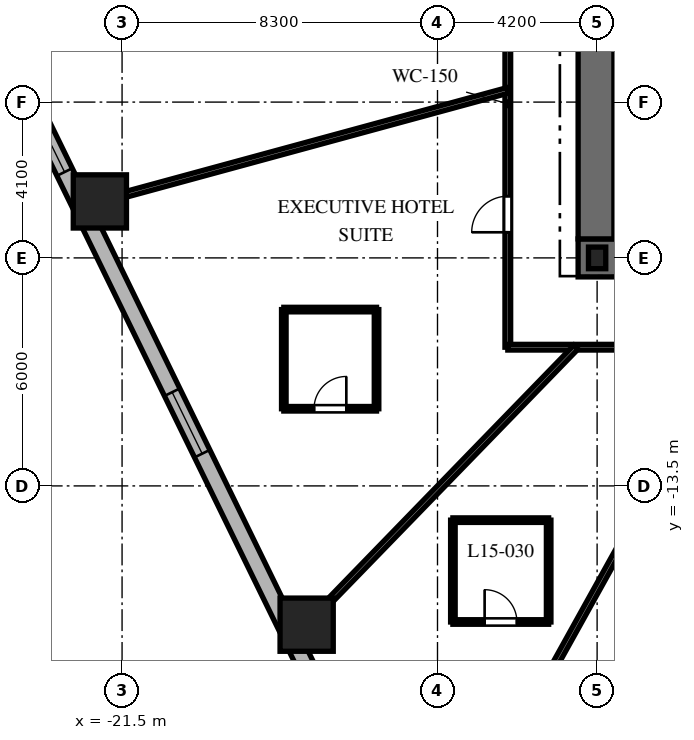
"""IFC4 building model, lengths in metres.
Left out: names, types, materials, properties, quantities, classifications, styles, units other than length and angle.
Written with IfcOpenShell. Run it as: python <this file> out.ifc"""

import sys

from ifc_helpers import new_model, si_unit, direction, frame, frame_2d, origin, origin_2d, place, context, subcontext, project, spatial, rectangle, i_section, extrude, element, fill, save


model = new_model("IFC4")
c1 = context("Model", 3, precision=1e-05, world=origin(), true_north=direction((0.0, 1.0)))
c2 = subcontext(c1, "Body", "Model", "MODEL_VIEW")
j1 = project(units=[si_unit("LENGTHUNIT", "METRE"), si_unit("PLANEANGLEUNIT", "RADIAN")], contexts=[c1])
p1 = place(None, origin())
s1 = spatial("IfcSite", under=j1, at=p1, CompositionType="ELEMENT")
p2 = place(p1, origin())
s2 = spatial("IfcBuilding", under=s1, at=p2, CompositionType="ELEMENT")
p3 = place(p2, frame((0.0, 0.0, 67.5)))
s3 = spatial("IfcBuildingStorey", under=s2, at=p3, CompositionType="ELEMENT", Elevation=67.5)
p4 = place(p3, frame((-9.5, -7.5, 0.0), z_axis=(0.0, 0.0, 1.0), x_axis=(1.0, 0.0, 0.0)))
e1 = element("IfcWall", 1, at=p4, inside=s3, PredefinedType="SHEAR", context=c2, shape_type="SweptSolid", body=[
    extrude(rectangle(XDim=19.0, YDim=1.0, at=frame_2d((9.5, 0.0))), origin(), (0.0, 0.0, 1.0), 3.7),
])
p5 = place(p4, frame((9.55, 0.0, 0.0)))
e2 = element("IfcOpeningElement", 2, at=p5, cuts=e1, PredefinedType="OPENING", context=c2, shape_type="SweptSolid", body=[
    extrude(rectangle(XDim=1.0, YDim=2.15, at=frame_2d((0.5, 1.075))), frame((0.0, 0.51, 0.0), z_axis=(0.0, -1.0, 0.0), x_axis=(1.0, 0.0, 0.0)), (0.0, 0.0, 1.0), 1.02),
])
p6 = place(p3, frame((-9.0, -7.0, 0.0), z_axis=(0.0, 0.0, 1.0), x_axis=(0.0, 1.0, 0.0)))
e3 = element("IfcWall", 3, at=p6, inside=s3, PredefinedType="SHEAR", context=c2, shape_type="SweptSolid", body=[
    extrude(rectangle(XDim=14.0, YDim=1.0, at=frame_2d((7.0, 0.0))), origin(), (0.0, 0.0, 1.0), 3.7),
])
p7 = place(p6, frame((10.125, 0.0, 0.0)))
e4 = element("IfcOpeningElement", 4, at=p7, cuts=e3, PredefinedType="OPENING", context=c2, shape_type="SweptSolid", body=[
    extrude(rectangle(XDim=1.05, YDim=2.15, at=frame_2d((0.525, 1.075))), frame((0.0, 0.51, 0.0), z_axis=(0.0, -1.0, 0.0), x_axis=(1.0, 0.0, 0.0)), (0.0, 0.0, 1.0), 1.02),
])
p8 = place(p3, frame((-8.458, -6.985, 0.0), z_axis=(0.0, 0.0, 1.0), x_axis=(0.0, 1.0, 0.0)))
e5 = element("IfcWall", 5, at=p8, inside=s3, PredefinedType="SHEAR", context=c2, shape_type="SweptSolid", body=[
    extrude(rectangle(XDim=9.143, YDim=0.2, at=frame_2d((4.572, 0.0))), origin(), (0.0, 0.0, 1.0), 3.7),
])
p9 = place(p3, frame((-9.0, -7.5, 0.0), z_axis=(0.0, 0.0, 1.0), x_axis=(1.0, 0.0, 0.0)))
e6 = element("IfcColumn", 6, at=p9, inside=s3, PredefinedType="COLUMN", context=c2, shape_type="SweptSolid", body=[
    extrude(i_section(OverallWidth=0.454, OverallDepth=0.569, WebThickness=0.078, FlangeThickness=0.125, at=origin_2d()), origin(), (0.0, 0.0, 1.0), 3.7),
])
for number, where, z_axis, x_axis in (
    (7, (-22.084, -6.014, 0.0), (0.0, 0.0, 1.0), (1.0, 0.0, 0.0)),
    (8, (-16.643, -17.152, 0.0), (0.0, 0.0, 1.0), (1.0, 0.0, 0.0)),
):
    element("IfcColumn", number, at=place(p3, frame(where, z_axis=z_axis, x_axis=x_axis)), inside=s3, PredefinedType="COLUMN", context=c2, shape_type="SweptSolid", body=[
        extrude(rectangle(XDim=1.4, YDim=1.4, at=origin_2d()), origin(), (0.0, 0.0, 1.0), 3.7),
    ])
p10 = place(p3, frame((-24.336, -2.532, 0.0), z_axis=(0.0, 0.0, 1.0), x_axis=(0.438931326393, -0.898520612291, 0.0)))
e9 = element("IfcWall", 9, at=p10, inside=s3, PredefinedType="SOLIDWALL", context=c2, shape_type="SweptSolid", body=[
    extrude(rectangle(XDim=20.623, YDim=0.45, at=frame_2d((10.312, 0.0))), origin(), (0.0, 0.0, 1.0), 3.4),
])
p11 = place(p10, frame((1.214, 0.0, 0.8)))
e10 = element("IfcOpeningElement", 10, at=p11, cuts=e9, PredefinedType="OPENING", context=c2, shape_type="SweptSolid", body=[
    extrude(rectangle(XDim=1.8, YDim=1.8, at=frame_2d((0.9, 0.9))), frame((0.0, 0.235, 0.0), z_axis=(0.0, -1.0, 0.0), x_axis=(1.0, 0.0, 0.0)), (0.0, 0.0, 1.0), 0.47),
])
p12 = place(p10, frame((9.462, 0.0, 0.8)))
e11 = element("IfcOpeningElement", 11, at=p12, cuts=e9, PredefinedType="OPENING", context=c2, shape_type="SweptSolid", body=[
    extrude(rectangle(XDim=1.8, YDim=1.8, at=frame_2d((0.9, 0.9))), frame((0.0, 0.235, 0.0), z_axis=(0.0, -1.0, 0.0), x_axis=(1.0, 0.0, 0.0)), (0.0, 0.0, 1.0), 0.47),
])
p13 = place(p10, frame((17.66, 0.0, 0.8)))
e12 = element("IfcOpeningElement", 12, at=p13, cuts=e9, PredefinedType="OPENING", context=c2, shape_type="SweptSolid", body=[
    extrude(rectangle(XDim=1.8, YDim=1.8, at=frame_2d((0.9, 0.9))), frame((0.0, 0.235, 0.0), z_axis=(0.0, -1.0, 0.0), x_axis=(1.0, 0.0, 0.0)), (0.0, 0.0, 1.0), 0.47),
])
p14 = place(p3, frame((-11.35, -9.85, 0.0), z_axis=(0.0, 0.0, 1.0), x_axis=(0.0, 1.0, 0.0)))
e13 = element("IfcWall", 13, at=p14, inside=s3, PredefinedType="PARTITIONING", context=c2, shape_type="SweptSolid", body=[
    extrude(rectangle(XDim=19.7, YDim=0.15, at=frame_2d((9.85, 0.0))), origin(), (0.0, 0.0, 1.0), 2.84),
])
p15 = place(p14, frame((16.714, 0.0, 0.0)))
e14 = element("IfcOpeningElement", 14, at=p15, cuts=e13, PredefinedType="OPENING", context=c2, shape_type="SweptSolid", body=[
    extrude(rectangle(XDim=0.95, YDim=2.03, at=frame_2d((0.475, 1.015))), frame((0.0, 0.085, 0.0), z_axis=(0.0, -1.0, 0.0), x_axis=(1.0, 0.0, 0.0)), (0.0, 0.0, 1.0), 0.17),
])
p16 = place(p14, frame((12.932, 0.0, 0.0)))
e15 = element("IfcOpeningElement", 15, at=p16, cuts=e13, PredefinedType="OPENING", context=c2, shape_type="SweptSolid", body=[
    extrude(rectangle(XDim=0.95, YDim=2.03, at=frame_2d((0.475, 1.015))), frame((0.0, 0.085, 0.0), z_axis=(0.0, -1.0, 0.0), x_axis=(1.0, 0.0, 0.0)), (0.0, 0.0, 1.0), 0.17),
])
p17 = place(p14, frame((8.838, 0.0, 0.0)))
e16 = element("IfcOpeningElement", 16, at=p17, cuts=e13, PredefinedType="OPENING", context=c2, shape_type="SweptSolid", body=[
    extrude(rectangle(XDim=0.95, YDim=2.03, at=frame_2d((0.475, 1.015))), frame((0.0, 0.085, 0.0), z_axis=(0.0, -1.0, 0.0), x_axis=(1.0, 0.0, 0.0)), (0.0, 0.0, 1.0), 0.17),
])
p18 = place(p14, frame((3.024, 0.0, 0.0)))
e17 = element("IfcOpeningElement", 17, at=p18, cuts=e13, PredefinedType="OPENING", context=c2, shape_type="SweptSolid", body=[
    extrude(rectangle(XDim=0.95, YDim=2.03, at=frame_2d((0.475, 1.015))), frame((0.0, 0.085, 0.0), z_axis=(0.0, -1.0, 0.0), x_axis=(1.0, 0.0, 0.0)), (0.0, 0.0, 1.0), 0.17),
])
p19 = place(p3, frame((11.35, -9.85, 0.0), z_axis=(0.0, 0.0, 1.0), x_axis=(-1.0, 0.0, 0.0)))
e18 = element("IfcWall", 18, at=p19, inside=s3, PredefinedType="PARTITIONING", context=c2, shape_type="SweptSolid", body=[
    extrude(rectangle(XDim=22.7, YDim=0.15, at=frame_2d((11.35, 0.0))), origin(), (0.0, 0.0, 1.0), 2.84),
])
p20 = place(p19, frame((18.436, 0.0, 0.0)))
e19 = element("IfcOpeningElement", 19, at=p20, cuts=e18, PredefinedType="OPENING", context=c2, shape_type="SweptSolid", body=[
    extrude(rectangle(XDim=0.95, YDim=2.03, at=frame_2d((0.475, 1.015))), frame((0.0, 0.085, 0.0), z_axis=(0.0, -1.0, 0.0), x_axis=(1.0, 0.0, 0.0)), (0.0, 0.0, 1.0), 0.17),
])
p21 = place(p19, frame((15.176, 0.0, 0.0)))
e20 = element("IfcOpeningElement", 20, at=p21, cuts=e18, PredefinedType="OPENING", context=c2, shape_type="SweptSolid", body=[
    extrude(rectangle(XDim=0.9, YDim=2.03, at=frame_2d((0.45, 1.015))), frame((0.0, 0.085, 0.0), z_axis=(0.0, -1.0, 0.0), x_axis=(1.0, 0.0, 0.0)), (0.0, 0.0, 1.0), 0.17),
])
p22 = place(p19, frame((10.444, 0.0, 0.0)))
e21 = element("IfcOpeningElement", 21, at=p22, cuts=e18, PredefinedType="OPENING", context=c2, shape_type="SweptSolid", body=[
    extrude(rectangle(XDim=0.95, YDim=2.03, at=frame_2d((0.475, 1.015))), frame((0.0, 0.085, 0.0), z_axis=(0.0, -1.0, 0.0), x_axis=(1.0, 0.0, 0.0)), (0.0, 0.0, 1.0), 0.17),
])
p23 = place(p19, frame((3.369, 0.0, 0.0)))
e22 = element("IfcOpeningElement", 22, at=p23, cuts=e18, PredefinedType="OPENING", context=c2, shape_type="SweptSolid", body=[
    extrude(rectangle(XDim=0.95, YDim=2.03, at=frame_2d((0.475, 1.015))), frame((0.0, 0.085, 0.0), z_axis=(0.0, -1.0, 0.0), x_axis=(1.0, 0.0, 0.0)), (0.0, 0.0, 1.0), 0.17),
])
p24 = place(p3, frame((-11.35, -3.091, 0.0), z_axis=(0.0, 0.0, 1.0), x_axis=(-0.964859685283, -0.262765651704, 0.0)))
e23 = element("IfcWall", 23, at=p24, inside=s3, PredefinedType="PARTITIONING", context=c2, shape_type="SweptSolid", body=[
    extrude(rectangle(XDim=11.629, YDim=0.15, at=frame_2d((5.814, 0.0))), origin(), (0.0, 0.0, 1.0), 2.54),
])
p25 = place(p3, frame((-9.558, -9.85, 0.0), z_axis=(0.0, 0.0, 1.0), x_axis=(-0.69638346089, -0.717669893056, 0.0)))
e24 = element("IfcWall", 24, at=p25, inside=s3, PredefinedType="PARTITIONING", context=c2, shape_type="SweptSolid", body=[
    extrude(rectangle(XDim=10.701, YDim=0.15, at=frame_2d((5.351, 0.0))), origin(), (0.0, 0.0, 1.0), 2.54),
])
p26 = place(p3, frame((-5.471, -9.85, 0.0), z_axis=(0.0, 0.0, 1.0), x_axis=(-0.48553323157, -0.874218211341, 0.0)))
e25 = element("IfcWall", 25, at=p26, inside=s3, PredefinedType="PARTITIONING", context=c2, shape_type="SweptSolid", body=[
    extrude(rectangle(XDim=14.74, YDim=0.15, at=frame_2d((7.37, 0.0))), origin(), (0.0, 0.0, 1.0), 2.54),
])
p27 = place(p3, frame((-17.244, -11.47, 0.0), z_axis=(0.0, 0.0, 1.0), x_axis=(1.0, 0.0, 0.0)))
e26 = element("IfcWall", 26, at=p27, inside=s3, PredefinedType="PARTITIONING", context=c2, shape_type="SweptSolid", body=[
    extrude(rectangle(XDim=2.44, YDim=0.12, at=frame_2d((1.22, 0.0))), origin(), (0.0, 0.0, 1.0), 2.927),
])
p28 = place(p27, frame((0.795, 0.0, 0.0)))
e27 = element("IfcOpeningElement", 27, at=p28, cuts=e26, PredefinedType="OPENING", context=c2, shape_type="SweptSolid", body=[
    extrude(rectangle(XDim=0.85, YDim=2.03, at=frame_2d((0.425, 1.015))), frame((0.0, 0.07, 0.0), z_axis=(0.0, -1.0, 0.0), x_axis=(1.0, 0.0, 0.0)), (0.0, 0.0, 1.0), 0.14),
])
p29 = place(p3, frame((-14.804, -11.47, 0.0), z_axis=(0.0, 0.0, 1.0), x_axis=(0.0, 1.0, 0.0)))
e28 = element("IfcWall", 28, at=p29, inside=s3, PredefinedType="PARTITIONING", context=c2, shape_type="SweptSolid", body=[
    extrude(rectangle(XDim=2.61, YDim=0.12, at=frame_2d((1.305, 0.0))), origin(), (0.0, 0.0, 1.0), 3.4),
])
p30 = place(p3, frame((-14.804, -8.86, 0.0), z_axis=(0.0, 0.0, 1.0), x_axis=(-1.0, 0.0, 0.0)))
e29 = element("IfcWall", 29, at=p30, inside=s3, PredefinedType="PARTITIONING", context=c2, shape_type="SweptSolid", body=[
    extrude(rectangle(XDim=2.44, YDim=0.12, at=frame_2d((1.22, 0.0))), origin(), (0.0, 0.0, 1.0), 2.927),
])
p31 = place(p3, frame((-17.244, -8.86, 0.0), z_axis=(0.0, 0.0, 1.0), x_axis=(0.0, -1.0, 0.0)))
e30 = element("IfcWall", 30, at=p31, inside=s3, PredefinedType="PARTITIONING", context=c2, shape_type="SweptSolid", body=[
    extrude(rectangle(XDim=2.61, YDim=0.12, at=frame_2d((1.305, 0.0))), origin(), (0.0, 0.0, 1.0), 3.4),
])
p32 = place(p3, frame((-12.795, -17.081, 0.0), z_axis=(0.0, 0.0, 1.0), x_axis=(1.0, 0.0, 0.0)))
e31 = element("IfcWall", 31, at=p32, inside=s3, PredefinedType="PARTITIONING", context=c2, shape_type="SweptSolid", body=[
    extrude(rectangle(XDim=2.52, YDim=0.12, at=frame_2d((1.26, 0.0))), origin(), (0.0, 0.0, 1.0), 3.4),
])
p33 = place(p32, frame((0.835, 0.0, 0.0)))
e32 = element("IfcOpeningElement", 32, at=p33, cuts=e31, PredefinedType="OPENING", context=c2, shape_type="SweptSolid", body=[
    extrude(rectangle(XDim=0.85, YDim=2.03, at=frame_2d((0.425, 1.015))), frame((0.0, 0.07, 0.0), z_axis=(0.0, -1.0, 0.0), x_axis=(1.0, 0.0, 0.0)), (0.0, 0.0, 1.0), 0.14),
])
p34 = place(p3, frame((-10.275, -17.081, 0.0), z_axis=(0.0, 0.0, 1.0), x_axis=(0.0, 1.0, 0.0)))
e33 = element("IfcWall", 33, at=p34, inside=s3, PredefinedType="PARTITIONING", context=c2, shape_type="SweptSolid", body=[
    extrude(rectangle(XDim=2.68, YDim=0.12, at=frame_2d((1.34, 0.0))), origin(), (0.0, 0.0, 1.0), 2.972),
])
p35 = place(p3, frame((-10.275, -14.401, 0.0), z_axis=(0.0, 0.0, 1.0), x_axis=(-1.0, 0.0, 0.0)))
e34 = element("IfcWall", 34, at=p35, inside=s3, PredefinedType="PARTITIONING", context=c2, shape_type="SweptSolid", body=[
    extrude(rectangle(XDim=2.52, YDim=0.12, at=frame_2d((1.26, 0.0))), origin(), (0.0, 0.0, 1.0), 3.4),
])
p36 = place(p3, frame((-12.795, -14.401, 0.0), z_axis=(0.0, 0.0, 1.0), x_axis=(0.0, -1.0, 0.0)))
e35 = element("IfcWall", 35, at=p36, inside=s3, PredefinedType="PARTITIONING", context=c2, shape_type="SweptSolid", body=[
    extrude(rectangle(XDim=2.68, YDim=0.12, at=frame_2d((1.34, 0.0))), origin(), (0.0, 0.0, 1.0), 2.972),
])
p37 = place(p11, origin())
e36 = element("IfcWindow", 36, at=p37, inside=s3, PartitioningType="SINGLE_PANEL", PredefinedType="WINDOW", context=c2, shape_type="SweptSolid", body=[
    extrude(rectangle(XDim=1.8, YDim=1.8, at=frame_2d((0.9, 0.9))), frame((0.0, 0.03, 0.0), z_axis=(0.0, -1.0, 0.0), x_axis=(1.0, 0.0, 0.0)), (0.0, 0.0, 1.0), 0.06),
])
fill(e10, e36)
p38 = place(p12, origin())
e37 = element("IfcWindow", 37, at=p38, inside=s3, PartitioningType="SINGLE_PANEL", PredefinedType="WINDOW", context=c2, shape_type="SweptSolid", body=[
    extrude(rectangle(XDim=1.8, YDim=1.8, at=frame_2d((0.9, 0.9))), frame((0.0, 0.03, 0.0), z_axis=(0.0, -1.0, 0.0), x_axis=(1.0, 0.0, 0.0)), (0.0, 0.0, 1.0), 0.06),
])
fill(e11, e37)
p39 = place(p18, origin())
e38 = element("IfcDoor", 38, at=p39, inside=s3, OperationType="SINGLE_SWING_LEFT", PredefinedType="DOOR", context=c2, shape_type="SweptSolid", body=[
    extrude(rectangle(XDim=0.95, YDim=2.03, at=frame_2d((0.475, 1.015))), frame((0.0, 0.025, 0.0), z_axis=(0.0, -1.0, 0.0), x_axis=(1.0, 0.0, 0.0)), (0.0, 0.0, 1.0), 0.05),
])
fill(e17, e38)
p40 = place(p28, origin())
e39 = element("IfcDoor", 39, at=p40, inside=s3, OperationType="SINGLE_SWING_RIGHT", PredefinedType="DOOR", context=c2, shape_type="SweptSolid", body=[
    extrude(rectangle(XDim=0.85, YDim=2.03, at=frame_2d((0.425, 1.015))), frame((0.0, 0.025, 0.0), z_axis=(0.0, -1.0, 0.0), x_axis=(1.0, 0.0, 0.0)), (0.0, 0.0, 1.0), 0.05),
])
fill(e27, e39)
p41 = place(p33, origin())
e40 = element("IfcDoor", 40, at=p41, inside=s3, OperationType="SINGLE_SWING_LEFT", PredefinedType="DOOR", context=c2, shape_type="SweptSolid", body=[
    extrude(rectangle(XDim=0.85, YDim=2.03, at=frame_2d((0.425, 1.015))), frame((0.0, 0.025, 0.0), z_axis=(0.0, -1.0, 0.0), x_axis=(1.0, 0.0, 0.0)), (0.0, 0.0, 1.0), 0.05),
])
fill(e32, e40)
save(model, sys.argv[1])
